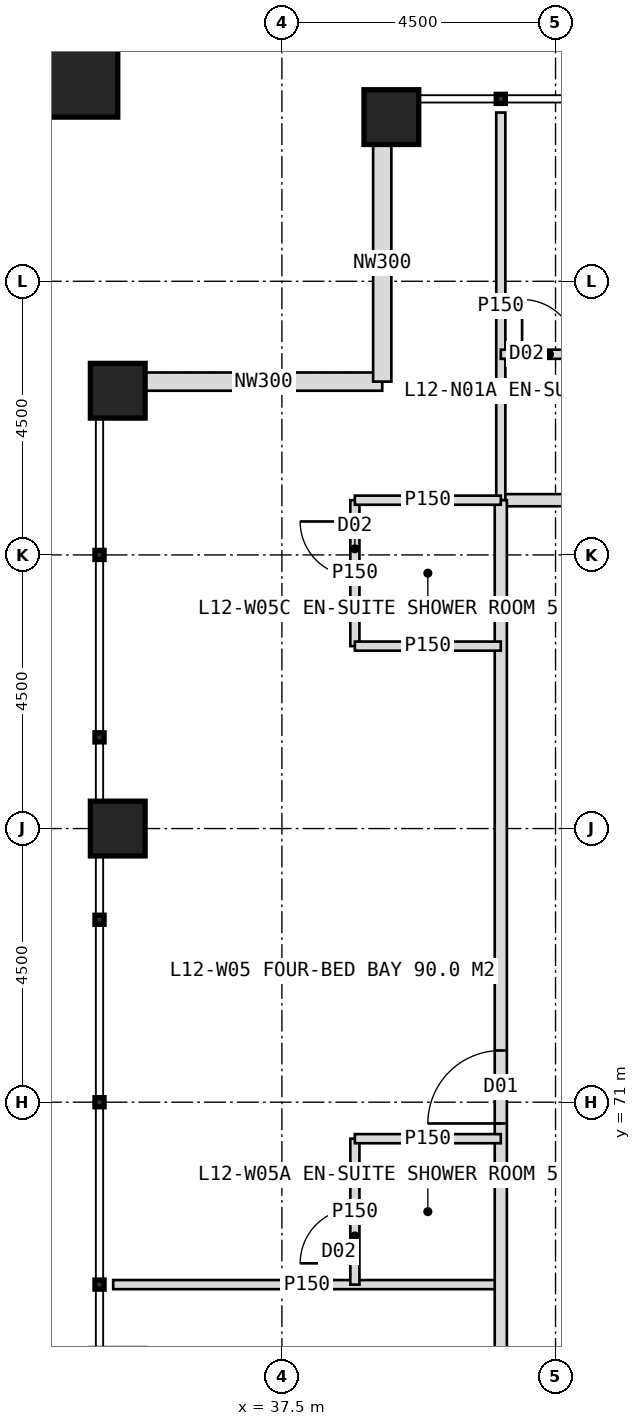
"""IFC4 building model, lengths in metres.
Left out: names, types, materials, properties, quantities, classifications, styles, units other than length and angle.
Written with IfcOpenShell. Run it as: python <this file> out.ifc"""

import sys

from ifc_helpers import new_model, si_unit, direction, frame, frame_2d, origin, origin_2d, place, context, subcontext, project, spatial, rectangle, hollow_rectangle, extrude, element, fill, save


model = new_model("IFC4")
c1 = context("Model", 3, precision=1e-05, world=origin(), true_north=direction((0.0, 1.0)))
c2 = subcontext(c1, "Body", "Model", "MODEL_VIEW")
j1 = project(units=[si_unit("LENGTHUNIT", "METRE"), si_unit("PLANEANGLEUNIT", "RADIAN")], contexts=[c1])
p1 = place(None, origin())
s1 = spatial("IfcSite", under=j1, at=p1, CompositionType="ELEMENT")
p2 = place(p1, origin())
s2 = spatial("IfcBuilding", under=s1, at=p2, CompositionType="ELEMENT")
p3 = place(p2, frame((0.0, 0.0, 55.0)))
s3 = spatial("IfcBuildingStorey", under=s2, at=p3, CompositionType="ELEMENT", Elevation=55.0)
for number, where, z_axis, x_axis in (
    (1, (39.3, 87.2, 0.0), (0.0, 0.0, 1.0), (1.0, 0.0, 0.0)),
    (2, (34.8, 75.5, 0.0), (0.0, 0.0, 1.0), (1.0, 0.0, 0.0)),
    (3, (34.8, 82.7, 0.0), (0.0, 0.0, 1.0), (1.0, 0.0, 0.0)),
):
    element("IfcColumn", number, at=place(p3, frame(where, z_axis=z_axis, x_axis=x_axis)), inside=s3, PredefinedType="COLUMN", context=c2, shape_type="SweptSolid", body=[
        extrude(hollow_rectangle(XDim=0.9, YDim=0.9, WallThickness=0.08, at=origin_2d()), origin(), (0.0, 0.0, 1.0), 4.0),
    ])
p4 = place(p3, frame((33.9, 88.1, 0.0), z_axis=(0.0, 0.0, 1.0), x_axis=(1.0, 0.0, 0.0)))
e4 = element("IfcColumn", 4, at=p4, inside=s3, PredefinedType="COLUMN", context=c2, shape_type="SweptSolid", body=[
    extrude(hollow_rectangle(XDim=1.8, YDim=1.8, WallThickness=0.1, at=origin_2d()), origin(), (0.0, 0.0, 1.0), 4.0),
])
for number, where, z_axis, x_axis in (
    (5, (35.25, 82.85, 0.0), (0.0, 0.0, 1.0), (1.0, 0.0, 0.0)),
    (6, (39.15, 82.85, 0.0), (0.0, 0.0, 1.0), (0.0, 1.0, 0.0)),
):
    element("IfcWall", number, at=place(p3, frame(where, z_axis=z_axis, x_axis=x_axis)), inside=s3, PredefinedType="ELEMENTEDWALL", context=c2, shape_type="SweptSolid", body=[
        extrude(rectangle(XDim=3.9, YDim=0.3, at=frame_2d((1.95, 0.0))), origin(), (0.0, 0.0, 1.0), 2.95),
    ])
p5 = place(p3, frame((41.1, 80.9, 0.0), z_axis=(0.0, 0.0, 1.0), x_axis=(1.0, 0.0, 0.0)))
e7 = element("IfcWall", 7, at=p5, inside=s3, PredefinedType="PARTITIONING", context=c2, shape_type="SweptSolid", body=[
    extrude(rectangle(XDim=37.8, YDim=0.2, at=frame_2d((18.9, 0.0))), origin(), (0.0, 0.0, 1.0), 3.75),
])
p6 = place(p5, frame((3.25, 0.0, 0.0)))
e8 = element("IfcOpeningElement", 8, at=p6, cuts=e7, PredefinedType="OPENING", context=c2, shape_type="SweptSolid", body=[
    extrude(rectangle(XDim=1.2, YDim=2.2, at=frame_2d((0.6, 1.1))), frame((0.0, 0.11, 0.0), z_axis=(0.0, -1.0, 0.0), x_axis=(1.0, 0.0, 0.0)), (0.0, 0.0, 1.0), 0.22),
])
p7 = place(p5, frame((9.55, 0.0, 0.0)))
e9 = element("IfcOpeningElement", 9, at=p7, cuts=e7, PredefinedType="OPENING", context=c2, shape_type="SweptSolid", body=[
    extrude(rectangle(XDim=1.2, YDim=2.2, at=frame_2d((0.6, 1.1))), frame((0.0, 0.11, 0.0), z_axis=(0.0, -1.0, 0.0), x_axis=(1.0, 0.0, 0.0)), (0.0, 0.0, 1.0), 0.22),
])
p8 = place(p5, frame((15.55, 0.0, 0.0)))
e10 = element("IfcOpeningElement", 10, at=p8, cuts=e7, PredefinedType="OPENING", context=c2, shape_type="SweptSolid", body=[
    extrude(rectangle(XDim=1.2, YDim=2.2, at=frame_2d((0.6, 1.1))), frame((0.0, 0.11, 0.0), z_axis=(0.0, -1.0, 0.0), x_axis=(1.0, 0.0, 0.0)), (0.0, 0.0, 1.0), 0.22),
])
p9 = place(p5, frame((21.4, 0.0, 0.0)))
e11 = element("IfcOpeningElement", 11, at=p9, cuts=e7, PredefinedType="OPENING", context=c2, shape_type="SweptSolid", body=[
    extrude(rectangle(XDim=1.0, YDim=2.1, at=frame_2d((0.5, 1.05))), frame((0.0, 0.11, 0.0), z_axis=(0.0, -1.0, 0.0), x_axis=(1.0, 0.0, 0.0)), (0.0, 0.0, 1.0), 0.22),
])
p10 = place(p5, frame((27.55, 0.0, 0.0)))
e12 = element("IfcOpeningElement", 12, at=p10, cuts=e7, PredefinedType="OPENING", context=c2, shape_type="SweptSolid", body=[
    extrude(rectangle(XDim=1.2, YDim=2.2, at=frame_2d((0.6, 1.1))), frame((0.0, 0.11, 0.0), z_axis=(0.0, -1.0, 0.0), x_axis=(1.0, 0.0, 0.0)), (0.0, 0.0, 1.0), 0.22),
])
p11 = place(p3, frame((41.1, 80.9, 0.0), z_axis=(0.0, 0.0, 1.0), x_axis=(0.0, 1.0, 0.0)))
e13 = element("IfcWall", 13, at=p11, inside=s3, PredefinedType="PARTITIONING", context=c2, shape_type="SweptSolid", body=[
    extrude(rectangle(XDim=6.375, YDim=0.15, at=frame_2d((3.188, 0.0))), origin(), (0.0, 0.0, 1.0), 3.75),
])
p12 = place(p3, frame((41.1, 83.3, 0.0), z_axis=(0.0, 0.0, 1.0), x_axis=(1.0, 0.0, 0.0)))
e14 = element("IfcWall", 14, at=p12, inside=s3, PredefinedType="PARTITIONING", context=c2, shape_type="SweptSolid", body=[
    extrude(rectangle(XDim=3.0, YDim=0.15, at=frame_2d((1.5, 0.0))), origin(), (0.0, 0.0, 1.0), 3.75),
])
p13 = place(p12, frame((0.35, 0.0, 0.0)))
e15 = element("IfcOpeningElement", 15, at=p13, cuts=e14, PredefinedType="OPENING", context=c2, shape_type="SweptSolid", body=[
    extrude(rectangle(XDim=0.9, YDim=2.1, at=frame_2d((0.45, 1.05))), frame((0.0, 0.085, 0.0), z_axis=(0.0, -1.0, 0.0), x_axis=(1.0, 0.0, 0.0)), (0.0, 0.0, 1.0), 0.17),
])
p14 = place(p3, frame((41.1, 68.0, 0.0), z_axis=(0.0, 0.0, 1.0), x_axis=(-1.0, 0.0, 0.0)))
e16 = element("IfcWall", 16, at=p14, inside=s3, PredefinedType="PARTITIONING", context=c2, shape_type="SweptSolid", body=[
    extrude(rectangle(XDim=6.375, YDim=0.15, at=frame_2d((3.188, 0.0))), origin(), (0.0, 0.0, 1.0), 3.75),
])
p15 = place(p3, frame((41.1, 43.1, 0.0), z_axis=(0.0, 0.0, 1.0), x_axis=(0.0, 1.0, 0.0)))
e17 = element("IfcWall", 17, at=p15, inside=s3, PredefinedType="PARTITIONING", context=c2, shape_type="SweptSolid", body=[
    extrude(rectangle(XDim=37.8, YDim=0.2, at=frame_2d((18.9, 0.0))), origin(), (0.0, 0.0, 1.0), 3.75),
])
p16 = place(p15, frame((3.25, 0.0, 0.0)))
e18 = element("IfcOpeningElement", 18, at=p16, cuts=e17, PredefinedType="OPENING", context=c2, shape_type="SweptSolid", body=[
    extrude(rectangle(XDim=1.2, YDim=2.2, at=frame_2d((0.6, 1.1))), frame((0.0, 0.11, 0.0), z_axis=(0.0, -1.0, 0.0), x_axis=(1.0, 0.0, 0.0)), (0.0, 0.0, 1.0), 0.22),
])
p17 = place(p15, frame((9.55, 0.0, 0.0)))
e19 = element("IfcOpeningElement", 19, at=p17, cuts=e17, PredefinedType="OPENING", context=c2, shape_type="SweptSolid", body=[
    extrude(rectangle(XDim=1.2, YDim=2.2, at=frame_2d((0.6, 1.1))), frame((0.0, 0.11, 0.0), z_axis=(0.0, -1.0, 0.0), x_axis=(1.0, 0.0, 0.0)), (0.0, 0.0, 1.0), 0.22),
])
p18 = place(p15, frame((15.55, 0.0, 0.0)))
e20 = element("IfcOpeningElement", 20, at=p18, cuts=e17, PredefinedType="OPENING", context=c2, shape_type="SweptSolid", body=[
    extrude(rectangle(XDim=1.2, YDim=2.2, at=frame_2d((0.6, 1.1))), frame((0.0, 0.11, 0.0), z_axis=(0.0, -1.0, 0.0), x_axis=(1.0, 0.0, 0.0)), (0.0, 0.0, 1.0), 0.22),
])
p19 = place(p15, frame((21.55, 0.0, 0.0)))
e21 = element("IfcOpeningElement", 21, at=p19, cuts=e17, PredefinedType="OPENING", context=c2, shape_type="SweptSolid", body=[
    extrude(rectangle(XDim=1.2, YDim=2.2, at=frame_2d((0.6, 1.1))), frame((0.0, 0.11, 0.0), z_axis=(0.0, -1.0, 0.0), x_axis=(1.0, 0.0, 0.0)), (0.0, 0.0, 1.0), 0.22),
])
p20 = place(p15, frame((27.55, 0.0, 0.0)))
e22 = element("IfcOpeningElement", 22, at=p20, cuts=e17, PredefinedType="OPENING", context=c2, shape_type="SweptSolid", body=[
    extrude(rectangle(XDim=1.2, YDim=2.2, at=frame_2d((0.6, 1.1))), frame((0.0, 0.11, 0.0), z_axis=(0.0, -1.0, 0.0), x_axis=(1.0, 0.0, 0.0)), (0.0, 0.0, 1.0), 0.22),
])
p21 = place(p3, frame((38.7, 68.0, 0.0), z_axis=(0.0, 0.0, 1.0), x_axis=(0.0, 1.0, 0.0)))
e23 = element("IfcWall", 23, at=p21, inside=s3, PredefinedType="PARTITIONING", context=c2, shape_type="SweptSolid", body=[
    extrude(rectangle(XDim=2.4, YDim=0.15, at=frame_2d((1.2, 0.0))), origin(), (0.0, 0.0, 1.0), 3.75),
])
p22 = place(p21, frame((0.35, 0.0, 0.0)))
e24 = element("IfcOpeningElement", 24, at=p22, cuts=e23, PredefinedType="OPENING", context=c2, shape_type="SweptSolid", body=[
    extrude(rectangle(XDim=0.9, YDim=2.1, at=frame_2d((0.45, 1.05))), frame((0.0, 0.085, 0.0), z_axis=(0.0, -1.0, 0.0), x_axis=(1.0, 0.0, 0.0)), (0.0, 0.0, 1.0), 0.17),
])
p23 = place(p3, frame((41.1, 70.4, 0.0), z_axis=(0.0, 0.0, 1.0), x_axis=(-1.0, 0.0, 0.0)))
e25 = element("IfcWall", 25, at=p23, inside=s3, PredefinedType="PARTITIONING", context=c2, shape_type="SweptSolid", body=[
    extrude(rectangle(XDim=2.4, YDim=0.15, at=frame_2d((1.2, 0.0))), origin(), (0.0, 0.0, 1.0), 3.75),
])
p24 = place(p3, frame((38.7, 78.5, 0.0), z_axis=(0.0, 0.0, 1.0), x_axis=(0.0, 1.0, 0.0)))
e26 = element("IfcWall", 26, at=p24, inside=s3, PredefinedType="PARTITIONING", context=c2, shape_type="SweptSolid", body=[
    extrude(rectangle(XDim=2.4, YDim=0.15, at=frame_2d((1.2, 0.0))), origin(), (0.0, 0.0, 1.0), 3.75),
])
p25 = place(p24, frame((1.15, 0.0, 0.0)))
e27 = element("IfcOpeningElement", 27, at=p25, cuts=e26, PredefinedType="OPENING", context=c2, shape_type="SweptSolid", body=[
    extrude(rectangle(XDim=0.9, YDim=2.1, at=frame_2d((0.45, 1.05))), frame((0.0, 0.085, 0.0), z_axis=(0.0, -1.0, 0.0), x_axis=(1.0, 0.0, 0.0)), (0.0, 0.0, 1.0), 0.17),
])
for number, where, z_axis, x_axis in (
    (28, (41.1, 78.5, 0.0), (0.0, 0.0, 1.0), (-1.0, 0.0, 0.0)),
    (29, (41.1, 80.9, 0.0), (0.0, 0.0, 1.0), (-1.0, 0.0, 0.0)),
):
    element("IfcWall", number, at=place(p3, frame(where, z_axis=z_axis, x_axis=x_axis)), inside=s3, PredefinedType="PARTITIONING", context=c2, shape_type="SweptSolid", body=[
        extrude(rectangle(XDim=2.4, YDim=0.15, at=frame_2d((1.2, 0.0))), origin(), (0.0, 0.0, 1.0), 3.75),
    ])
p26 = place(p13, origin())
e30 = element("IfcDoor", 30, at=p26, inside=s3, OperationType="SINGLE_SWING_LEFT", PredefinedType="DOOR", context=c2, shape_type="SweptSolid", body=[
    extrude(rectangle(XDim=0.9, YDim=2.1, at=frame_2d((0.45, 1.05))), frame((0.0, 0.025, 0.0), z_axis=(0.0, -1.0, 0.0), x_axis=(1.0, 0.0, 0.0)), (0.0, 0.0, 1.0), 0.05),
])
fill(e15, e30)
p27 = place(p20, origin())
e31 = element("IfcDoor", 31, at=p27, inside=s3, OperationType="SINGLE_SWING_LEFT", PredefinedType="DOOR", context=c2, shape_type="SweptSolid", body=[
    extrude(rectangle(XDim=1.2, YDim=2.2, at=frame_2d((0.6, 1.1))), frame((0.0, 0.025, 0.0), z_axis=(0.0, -1.0, 0.0), x_axis=(1.0, 0.0, 0.0)), (0.0, 0.0, 1.0), 0.05),
])
fill(e22, e31)
p28 = place(p22, origin())
e32 = element("IfcDoor", 32, at=p28, inside=s3, OperationType="SINGLE_SWING_LEFT", PredefinedType="DOOR", context=c2, shape_type="SweptSolid", body=[
    extrude(rectangle(XDim=0.9, YDim=2.1, at=frame_2d((0.45, 1.05))), frame((0.0, 0.025, 0.0), z_axis=(0.0, -1.0, 0.0), x_axis=(1.0, 0.0, 0.0)), (0.0, 0.0, 1.0), 0.05),
])
fill(e24, e32)
p29 = place(p25, origin())
e33 = element("IfcDoor", 33, at=p29, inside=s3, OperationType="SINGLE_SWING_RIGHT", PredefinedType="DOOR", context=c2, shape_type="SweptSolid", body=[
    extrude(rectangle(XDim=0.9, YDim=2.1, at=frame_2d((0.45, 1.05))), frame((0.0, 0.025, 0.0), z_axis=(0.0, -1.0, 0.0), x_axis=(1.0, 0.0, 0.0)), (0.0, 0.0, 1.0), 0.05),
])
fill(e27, e33)
save(model, sys.argv[1])
